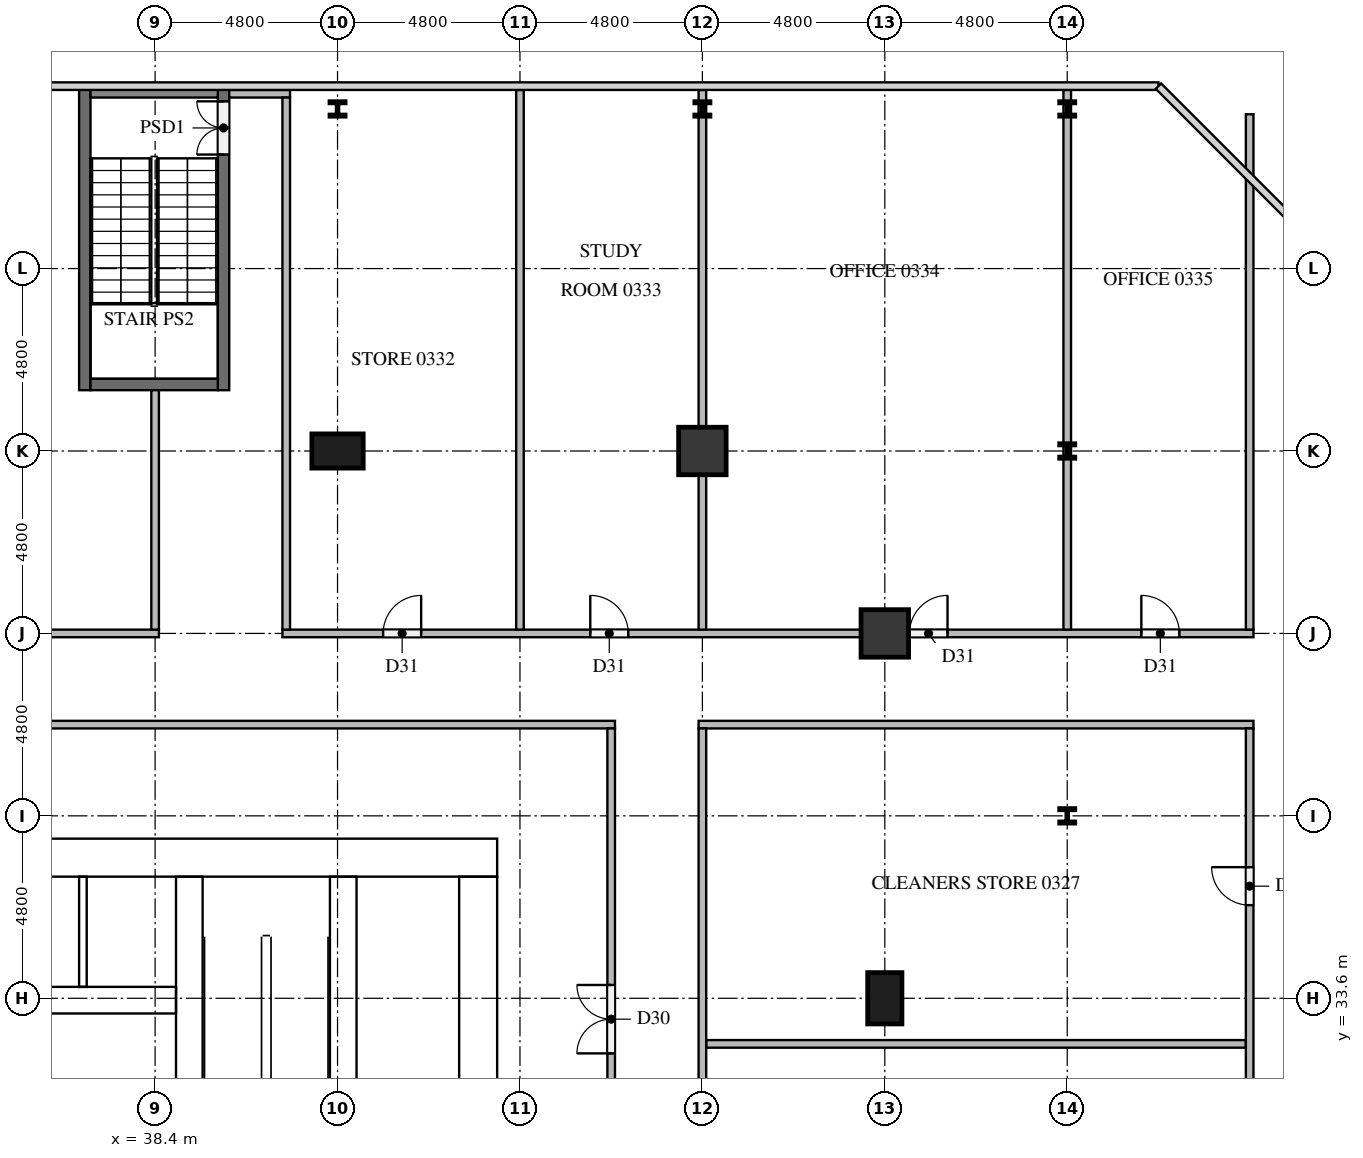
"""IFC4 building model, lengths in metres.
Left out: names, types, materials, properties, quantities, classifications, styles, units other than length and angle.
Written with IfcOpenShell. Run it as: python <this file> out.ifc"""

import sys

from ifc_helpers import new_model, si_unit, direction, frame, frame_2d, origin, origin_2d, place, context, subcontext, project, spatial, rectangle, i_section, extrude, element, fill, save


model = new_model("IFC4")
c1 = context("Model", 3, precision=1e-05, world=origin(), true_north=direction((0.0, 1.0)))
c2 = subcontext(c1, "Body", "Model", "MODEL_VIEW")
j1 = project(units=[si_unit("LENGTHUNIT", "METRE"), si_unit("PLANEANGLEUNIT", "RADIAN")], contexts=[c1])
p1 = place(None, origin())
s1 = spatial("IfcSite", under=j1, at=p1, CompositionType="ELEMENT")
p2 = place(p1, origin())
s2 = spatial("IfcBuilding", under=s1, at=p2, CompositionType="ELEMENT")
p3 = place(p2, frame((0.0, 0.0, 15.0)))
s3 = spatial("IfcBuildingStorey", under=s2, at=p3, CompositionType="ELEMENT", Elevation=15.0)
p4 = place(p3, frame((36.55, 49.6, 0.0), z_axis=(0.0, 0.0, 1.0), x_axis=(0.0, 1.0, 0.0)))
e1 = element("IfcWall", 1, at=p4, inside=s3, PredefinedType="SOLIDWALL", context=c2, shape_type="SweptSolid", body=[
    extrude(rectangle(XDim=8.0, YDim=0.3, at=frame_2d((4.0, 0.0))), origin(), (0.0, 0.0, 1.0), 4.2),
])
p5 = place(p3, frame((40.2, 49.6, 0.0), z_axis=(0.0, 0.0, 1.0), x_axis=(0.0, 1.0, 0.0)))
e2 = element("IfcWall", 2, at=p5, inside=s3, PredefinedType="SOLIDWALL", context=c2, shape_type="SweptSolid", body=[
    extrude(rectangle(XDim=8.0, YDim=0.3, at=frame_2d((4.0, 0.0))), origin(), (0.0, 0.0, 1.0), 4.2),
])
p6 = place(p5, frame((6.2, 0.0, 0.0)))
e3 = element("IfcOpeningElement", 3, at=p6, cuts=e2, PredefinedType="OPENING", context=c2, shape_type="SweptSolid", body=[
    extrude(rectangle(XDim=1.4, YDim=2.1, at=frame_2d((0.7, 1.05))), frame((0.0, 0.16, 0.0), z_axis=(0.0, -1.0, 0.0), x_axis=(1.0, 0.0, 0.0)), (0.0, 0.0, 1.0), 0.32),
])
for number, where, z_axis, x_axis in (
    (4, (36.7, 49.75, 0.0), (0.0, 0.0, 1.0), (1.0, 0.0, 0.0)),
    (5, (36.7, 57.45, 0.0), (0.0, 0.0, 1.0), (1.0, 0.0, 0.0)),
):
    element("IfcWall", number, at=place(p3, frame(where, z_axis=z_axis, x_axis=x_axis)), inside=s3, PredefinedType="SOLIDWALL", context=c2, shape_type="SweptSolid", body=[
        extrude(rectangle(XDim=3.35, YDim=0.3, at=frame_2d((1.675, 0.0))), origin(), (0.0, 0.0, 1.0), 4.2),
    ])
p7 = place(p3, frame((15.0, 37.3, 0.0), z_axis=(0.0, 0.0, 1.0), x_axis=(1.0, 0.0, 0.0)))
e6 = element("IfcWall", 6, at=p7, inside=s3, PredefinedType="SHEAR", context=c2, shape_type="SweptSolid", body=[
    extrude(rectangle(XDim=32.4, YDim=1.0, at=frame_2d((16.2, 0.0))), origin(), (0.0, 0.0, 1.0), 4.2),
])
p8 = place(p7, frame((15.3, 0.0, 0.0)))
e7 = element("IfcOpeningElement", 7, at=p8, cuts=e6, PredefinedType="OPENING", context=c2, shape_type="SweptSolid", body=[
    extrude(rectangle(XDim=1.8, YDim=2.1, at=frame_2d((0.9, 1.05))), frame((0.0, 0.51, 0.0), z_axis=(0.0, -1.0, 0.0), x_axis=(1.0, 0.0, 0.0)), (0.0, 0.0, 1.0), 1.02),
])
p9 = place(p7, frame((1.766, 0.0, 0.0)))
e8 = element("IfcOpeningElement", 8, at=p9, cuts=e6, PredefinedType="OPENING", context=c2, shape_type="SweptSolid", body=[
    extrude(rectangle(XDim=1.0, YDim=2.1, at=frame_2d((0.5, 1.05))), frame((0.0, 0.51, 0.0), z_axis=(0.0, -1.0, 0.0), x_axis=(1.0, 0.0, 0.0)), (0.0, 0.0, 1.0), 1.02),
])
p10 = place(p7, frame((5.241, 0.0, 0.0)))
e9 = element("IfcOpeningElement", 9, at=p10, cuts=e6, PredefinedType="OPENING", context=c2, shape_type="SweptSolid", body=[
    extrude(rectangle(XDim=1.0, YDim=2.1, at=frame_2d((0.5, 1.05))), frame((0.0, 0.51, 0.0), z_axis=(0.0, -1.0, 0.0), x_axis=(1.0, 0.0, 0.0)), (0.0, 0.0, 1.0), 1.02),
])
p11 = place(p3, frame((46.9, 16.0, 0.0), z_axis=(0.0, 0.0, 1.0), x_axis=(0.0, 1.0, 0.0)))
e10 = element("IfcWall", 10, at=p11, inside=s3, PredefinedType="SHEAR", context=c2, shape_type="SweptSolid", body=[
    extrude(rectangle(XDim=20.8, YDim=1.0, at=frame_2d((10.4, 0.0))), origin(), (0.0, 0.0, 1.0), 4.2),
])
p12 = place(p11, frame((10.1, 0.0, 0.0)))
e11 = element("IfcOpeningElement", 11, at=p12, cuts=e10, PredefinedType="OPENING", context=c2, shape_type="SweptSolid", body=[
    extrude(rectangle(XDim=1.2, YDim=2.1, at=frame_2d((0.6, 1.05))), frame((0.0, 0.51, 0.0), z_axis=(0.0, -1.0, 0.0), x_axis=(1.0, 0.0, 0.0)), (0.0, 0.0, 1.0), 1.02),
])
p13 = place(p3, frame((39.3, 27.75, 0.0), z_axis=(0.0, 0.0, 1.0), x_axis=(0.0, 1.0, 0.0)))
e12 = element("IfcWall", 12, at=p13, inside=s3, PredefinedType="SHEAR", context=c2, shape_type="SweptSolid", body=[
    extrude(rectangle(XDim=9.05, YDim=0.7, at=frame_2d((4.525, 0.0))), origin(), (0.0, 0.0, 1.0), 4.2),
])
p14 = place(p3, frame((43.35, 27.75, 0.0), z_axis=(0.0, 0.0, 1.0), x_axis=(0.0, 1.0, 0.0)))
e13 = element("IfcWall", 13, at=p14, inside=s3, PredefinedType="SHEAR", context=c2, shape_type="SweptSolid", body=[
    extrude(rectangle(XDim=9.05, YDim=0.7, at=frame_2d((4.525, 0.0))), origin(), (0.0, 0.0, 1.0), 4.2),
])
p15 = place(p14, frame((7.65, 0.0, 0.0)))
e14 = element("IfcOpeningElement", 14, at=p15, cuts=e13, PredefinedType="OPENING", context=c2, shape_type="SweptSolid", body=[
    extrude(rectangle(XDim=1.2, YDim=2.1, at=frame_2d((0.6, 1.05))), frame((0.0, 0.36, 0.0), z_axis=(0.0, -1.0, 0.0), x_axis=(1.0, 0.0, 0.0)), (0.0, 0.0, 1.0), 0.72),
])
p16 = place(p3, frame((33.35, 33.55, 0.0), z_axis=(0.0, 0.0, 1.0), x_axis=(1.0, 0.0, 0.0)))
e15 = element("IfcWall", 15, at=p16, inside=s3, PredefinedType="SHEAR", context=c2, shape_type="SweptSolid", body=[
    extrude(rectangle(XDim=5.6, YDim=0.7, at=frame_2d((2.8, 0.0))), origin(), (0.0, 0.0, 1.0), 4.2),
])
p17 = place(p3, frame((57.6, 33.6, 0.0), z_axis=(0.0, 0.0, 1.0), x_axis=(0.0, 1.0, 0.0)))
e16 = element("IfcColumn", 16, at=p17, inside=s3, PredefinedType="COLUMN", context=c2, shape_type="SweptSolid", body=[
    extrude(rectangle(XDim=1.35, YDim=0.9, at=origin_2d()), origin(), (0.0, 0.0, 1.0), 4.2),
])
for number, where, z_axis, x_axis in (
    (17, (57.6, 43.2, 0.0), (0.0, 0.0, 1.0), (1.0, 0.0, 0.0)),
    (18, (52.8, 48.0, 0.0), (0.0, 0.0, 1.0), (1.0, 0.0, 0.0)),
):
    element("IfcColumn", number, at=place(p3, frame(where, z_axis=z_axis, x_axis=x_axis)), inside=s3, PredefinedType="COLUMN", context=c2, shape_type="SweptSolid", body=[
        extrude(rectangle(XDim=1.25, YDim=1.25, at=origin_2d()), origin(), (0.0, 0.0, 1.0), 4.2),
    ])
p18 = place(p3, frame((43.2, 48.0, 0.0), z_axis=(0.0, 0.0, 1.0), x_axis=(1.0, 0.0, 0.0)))
e19 = element("IfcColumn", 19, at=p18, inside=s3, PredefinedType="COLUMN", context=c2, shape_type="SweptSolid", body=[
    extrude(rectangle(XDim=1.35, YDim=0.9, at=origin_2d()), origin(), (0.0, 0.0, 1.0), 4.2),
])
for number, where, z_axis, x_axis in (
    (20, (43.2, 57.0, 0.0), (0.0, 0.0, 1.0), (1.0, 0.0, 0.0)),
    (21, (52.8, 57.0, 0.0), (0.0, 0.0, 1.0), (1.0, 0.0, 0.0)),
    (22, (62.4, 38.4, 0.0), (0.0, 0.0, 1.0), (1.0, 0.0, 0.0)),
    (23, (62.4, 48.0, 0.0), (0.0, 0.0, 1.0), (1.0, 0.0, 0.0)),
    (24, (62.4, 57.0, 0.0), (0.0, 0.0, 1.0), (1.0, 0.0, 0.0)),
):
    element("IfcColumn", number, at=place(p3, frame(where, z_axis=z_axis, x_axis=x_axis)), inside=s3, PredefinedType="COLUMN", context=c2, shape_type="SweptSolid", body=[
        extrude(i_section(OverallWidth=0.396, OverallDepth=0.381, WebThickness=0.019, FlangeThickness=0.03, at=origin_2d()), origin(), (0.0, 0.0, 1.0), 4.2),
    ])
p19 = place(p3, frame((36.5, 33.9, 0.0), z_axis=(0.0, 0.0, 1.0), x_axis=(0.0, 1.0, 0.0)))
e25 = element("IfcWall", 25, at=p19, inside=s3, PredefinedType="SOLIDWALL", context=c2, shape_type="SweptSolid", body=[
    extrude(rectangle(XDim=2.9, YDim=0.2, at=frame_2d((1.45, 0.0))), origin(), (0.0, 0.0, 1.0), 4.2),
])
p20 = place(p3, frame((52.9, 32.4, 0.0), z_axis=(0.0, 0.0, 1.0), x_axis=(1.0, 0.0, 0.0)))
e26 = element("IfcWall", 26, at=p20, inside=s3, PredefinedType="PARTITIONING", context=c2, shape_type="SweptSolid", body=[
    extrude(rectangle(XDim=14.2, YDim=0.2, at=frame_2d((7.1, 0.0))), origin(), (0.0, 0.0, 1.0), 4.2),
])
p21 = place(p3, frame((50.5, 40.8, 0.0), z_axis=(0.0, 0.0, 1.0), x_axis=(-1.0, 0.0, 0.0)))
e27 = element("IfcWall", 27, at=p21, inside=s3, PredefinedType="PARTITIONING", context=c2, shape_type="SweptSolid", body=[
    extrude(rectangle(XDim=38.6, YDim=0.2, at=frame_2d((19.3, 0.0))), origin(), (0.0, 0.0, 1.0), 4.2),
])
p22 = place(p21, frame((18.45, 0.0, 0.0)))
e28 = element("IfcOpeningElement", 28, at=p22, cuts=e27, PredefinedType="OPENING", context=c2, shape_type="SweptSolid", body=[
    extrude(rectangle(XDim=1.8, YDim=2.1, at=frame_2d((0.9, 1.05))), frame((0.0, 0.11, 0.0), z_axis=(0.0, -1.0, 0.0), x_axis=(1.0, 0.0, 0.0)), (0.0, 0.0, 1.0), 0.22),
])
p23 = place(p21, frame((16.25, 0.0, 0.0)))
e29 = element("IfcOpeningElement", 29, at=p23, cuts=e27, PredefinedType="OPENING", context=c2, shape_type="SweptSolid", body=[
    extrude(rectangle(XDim=1.8, YDim=2.1, at=frame_2d((0.9, 1.05))), frame((0.0, 0.11, 0.0), z_axis=(0.0, -1.0, 0.0), x_axis=(1.0, 0.0, 0.0)), (0.0, 0.0, 1.0), 0.22),
])
p24 = place(p3, frame((52.7, 40.8, 0.0), z_axis=(0.0, 0.0, 1.0), x_axis=(1.0, 0.0, 0.0)))
e30 = element("IfcWall", 30, at=p24, inside=s3, PredefinedType="PARTITIONING", context=c2, shape_type="SweptSolid", body=[
    extrude(rectangle(XDim=14.6, YDim=0.2, at=frame_2d((7.3, 0.0))), origin(), (0.0, 0.0, 1.0), 4.2),
])
p25 = place(p3, frame((-4.9, 43.2, 0.0), z_axis=(0.0, 0.0, 1.0), x_axis=(1.0, 0.0, 0.0)))
e31 = element("IfcWall", 31, at=p25, inside=s3, PredefinedType="PARTITIONING", context=c2, shape_type="SweptSolid", body=[
    extrude(rectangle(XDim=43.4, YDim=0.2, at=frame_2d((21.7, 0.0))), origin(), (0.0, 0.0, 1.0), 4.2),
])
p26 = place(p25, frame((14.05, 0.0, 0.0)))
e32 = element("IfcOpeningElement", 32, at=p26, cuts=e31, PredefinedType="OPENING", context=c2, shape_type="SweptSolid", body=[
    extrude(rectangle(XDim=1.0, YDim=2.1, at=frame_2d((0.5, 1.05))), frame((0.0, 0.11, 0.0), z_axis=(0.0, -1.0, 0.0), x_axis=(1.0, 0.0, 0.0)), (0.0, 0.0, 1.0), 0.22),
])
p27 = place(p25, frame((23.55, 0.0, 0.0)))
e33 = element("IfcOpeningElement", 33, at=p27, cuts=e31, PredefinedType="OPENING", context=c2, shape_type="SweptSolid", body=[
    extrude(rectangle(XDim=1.0, YDim=2.1, at=frame_2d((0.5, 1.05))), frame((0.0, 0.11, 0.0), z_axis=(0.0, -1.0, 0.0), x_axis=(1.0, 0.0, 0.0)), (0.0, 0.0, 1.0), 0.22),
])
p28 = place(p25, frame((35.25, 0.0, 0.0)))
e34 = element("IfcOpeningElement", 34, at=p28, cuts=e31, PredefinedType="OPENING", context=c2, shape_type="SweptSolid", body=[
    extrude(rectangle(XDim=1.8, YDim=2.1, at=frame_2d((0.9, 1.05))), frame((0.0, 0.11, 0.0), z_axis=(0.0, -1.0, 0.0), x_axis=(1.0, 0.0, 0.0)), (0.0, 0.0, 1.0), 0.22),
])
p29 = place(p3, frame((41.75, 43.2, 0.0), z_axis=(0.0, 0.0, 1.0), x_axis=(1.0, 0.0, 0.0)))
e35 = element("IfcWall", 35, at=p29, inside=s3, PredefinedType="PARTITIONING", context=c2, shape_type="SweptSolid", body=[
    extrude(rectangle(XDim=25.55, YDim=0.2, at=frame_2d((12.775, 0.0))), origin(), (0.0, 0.0, 1.0), 4.2),
])
p30 = place(p29, frame((2.65, 0.0, 0.0)))
e36 = element("IfcOpeningElement", 36, at=p30, cuts=e35, PredefinedType="OPENING", context=c2, shape_type="SweptSolid", body=[
    extrude(rectangle(XDim=1.0, YDim=2.1, at=frame_2d((0.5, 1.05))), frame((0.0, 0.11, 0.0), z_axis=(0.0, -1.0, 0.0), x_axis=(1.0, 0.0, 0.0)), (0.0, 0.0, 1.0), 0.22),
])
p31 = place(p29, frame((8.1, 0.0, 0.0)))
e37 = element("IfcOpeningElement", 37, at=p31, cuts=e35, PredefinedType="OPENING", context=c2, shape_type="SweptSolid", body=[
    extrude(rectangle(XDim=1.0, YDim=2.1, at=frame_2d((0.5, 1.05))), frame((0.0, 0.11, 0.0), z_axis=(0.0, -1.0, 0.0), x_axis=(1.0, 0.0, 0.0)), (0.0, 0.0, 1.0), 0.22),
])
p32 = place(p29, frame((16.5, 0.0, 0.0)))
e38 = element("IfcOpeningElement", 38, at=p32, cuts=e35, PredefinedType="OPENING", context=c2, shape_type="SweptSolid", body=[
    extrude(rectangle(XDim=1.0, YDim=2.1, at=frame_2d((0.5, 1.05))), frame((0.0, 0.11, 0.0), z_axis=(0.0, -1.0, 0.0), x_axis=(1.0, 0.0, 0.0)), (0.0, 0.0, 1.0), 0.22),
])
p33 = place(p29, frame((22.6, 0.0, 0.0)))
e39 = element("IfcOpeningElement", 39, at=p33, cuts=e35, PredefinedType="OPENING", context=c2, shape_type="SweptSolid", body=[
    extrude(rectangle(XDim=1.0, YDim=2.1, at=frame_2d((0.5, 1.05))), frame((0.0, 0.11, 0.0), z_axis=(0.0, -1.0, 0.0), x_axis=(1.0, 0.0, 0.0)), (0.0, 0.0, 1.0), 0.22),
])
p34 = place(p3, frame((40.35, 57.4, 0.0), z_axis=(0.0, 0.0, 1.0), x_axis=(1.0, 0.0, 0.0)))
e40 = element("IfcWall", 40, at=p34, inside=s3, PredefinedType="PARTITIONING", context=c2, shape_type="SweptSolid", body=[
    extrude(rectangle(XDim=1.6, YDim=0.2, at=frame_2d((0.8, 0.0))), origin(), (0.0, 0.0, 1.0), 4.2),
])
p35 = place(p3, frame((38.4, 43.3, 0.0), z_axis=(0.0, 0.0, 1.0), x_axis=(0.0, 1.0, 0.0)))
e41 = element("IfcWall", 41, at=p35, inside=s3, PredefinedType="PARTITIONING", context=c2, shape_type="SweptSolid", body=[
    extrude(rectangle(XDim=6.3, YDim=0.2, at=frame_2d((3.15, 0.0))), origin(), (0.0, 0.0, 1.0), 4.2),
])
p36 = place(p3, frame((41.85, 43.3, 0.0), z_axis=(0.0, 0.0, 1.0), x_axis=(0.0, 1.0, 0.0)))
e42 = element("IfcWall", 42, at=p36, inside=s3, PredefinedType="PARTITIONING", context=c2, shape_type="SweptSolid", body=[
    extrude(rectangle(XDim=14.0, YDim=0.2, at=frame_2d((7.0, 0.0))), origin(), (0.0, 0.0, 1.0), 4.2),
])
p37 = place(p3, frame((48.0, 43.3, 0.0), z_axis=(0.0, 0.0, 1.0), x_axis=(0.0, 1.0, 0.0)))
e43 = element("IfcWall", 43, at=p37, inside=s3, PredefinedType="PARTITIONING", context=c2, shape_type="SweptSolid", body=[
    extrude(rectangle(XDim=14.2, YDim=0.2, at=frame_2d((7.1, 0.0))), origin(), (0.0, 0.0, 1.0), 4.2),
])
p38 = place(p3, frame((50.4, 12.1, 0.0), z_axis=(0.0, 0.0, 1.0), x_axis=(0.0, 1.0, 0.0)))
e44 = element("IfcWall", 44, at=p38, inside=s3, PredefinedType="PARTITIONING", context=c2, shape_type="SweptSolid", body=[
    extrude(rectangle(XDim=28.6, YDim=0.2, at=frame_2d((14.3, 0.0))), origin(), (0.0, 0.0, 1.0), 4.2),
])
p39 = place(p38, frame((20.05, 0.0, 0.0)))
e45 = element("IfcOpeningElement", 45, at=p39, cuts=e44, PredefinedType="OPENING", context=c2, shape_type="SweptSolid", body=[
    extrude(rectangle(XDim=1.8, YDim=2.1, at=frame_2d((0.9, 1.05))), frame((0.0, 0.11, 0.0), z_axis=(0.0, -1.0, 0.0), x_axis=(1.0, 0.0, 0.0)), (0.0, 0.0, 1.0), 0.22),
])
p40 = place(p3, frame((52.8, 43.3, 0.0), z_axis=(0.0, 0.0, 1.0), x_axis=(0.0, 1.0, 0.0)))
e46 = element("IfcWall", 46, at=p40, inside=s3, PredefinedType="PARTITIONING", context=c2, shape_type="SweptSolid", body=[
    extrude(rectangle(XDim=14.2, YDim=0.2, at=frame_2d((7.1, 0.0))), origin(), (0.0, 0.0, 1.0), 4.2),
])
p41 = place(p3, frame((52.8, 40.7, 0.0), z_axis=(0.0, 0.0, 1.0), x_axis=(0.0, -1.0, 0.0)))
e47 = element("IfcWall", 47, at=p41, inside=s3, PredefinedType="PARTITIONING", context=c2, shape_type="SweptSolid", body=[
    extrude(rectangle(XDim=28.6, YDim=0.2, at=frame_2d((14.3, 0.0))), origin(), (0.0, 0.0, 1.0), 4.2),
])
p42 = place(p41, frame((22.75, 0.0, 0.0)))
e48 = element("IfcOpeningElement", 48, at=p42, cuts=e47, PredefinedType="OPENING", context=c2, shape_type="SweptSolid", body=[
    extrude(rectangle(XDim=1.0, YDim=2.1, at=frame_2d((0.5, 1.05))), frame((0.0, 0.11, 0.0), z_axis=(0.0, -1.0, 0.0), x_axis=(1.0, 0.0, 0.0)), (0.0, 0.0, 1.0), 0.22),
])
p43 = place(p41, frame((12.55, 0.0, 0.0)))
e49 = element("IfcOpeningElement", 49, at=p43, cuts=e47, PredefinedType="OPENING", context=c2, shape_type="SweptSolid", body=[
    extrude(rectangle(XDim=1.0, YDim=2.1, at=frame_2d((0.5, 1.05))), frame((0.0, 0.11, 0.0), z_axis=(0.0, -1.0, 0.0), x_axis=(1.0, 0.0, 0.0)), (0.0, 0.0, 1.0), 0.22),
])
p44 = place(p3, frame((62.4, 43.3, 0.0), z_axis=(0.0, 0.0, 1.0), x_axis=(0.0, 1.0, 0.0)))
e50 = element("IfcWall", 50, at=p44, inside=s3, PredefinedType="PARTITIONING", context=c2, shape_type="SweptSolid", body=[
    extrude(rectangle(XDim=14.2, YDim=0.2, at=frame_2d((7.1, 0.0))), origin(), (0.0, 0.0, 1.0), 4.2),
])
p45 = place(p3, frame((67.2, 12.4, 0.0), z_axis=(0.0, 0.0, 1.0), x_axis=(0.0, 1.0, 0.0)))
e51 = element("IfcWall", 51, at=p45, inside=s3, PredefinedType="PARTITIONING", context=c2, shape_type="SweptSolid", body=[
    extrude(rectangle(XDim=28.3, YDim=0.2, at=frame_2d((14.15, 0.0))), origin(), (0.0, 0.0, 1.0), 4.2),
])
p46 = place(p45, frame((23.65, 0.0, 0.0)))
e52 = element("IfcOpeningElement", 52, at=p46, cuts=e51, PredefinedType="OPENING", context=c2, shape_type="SweptSolid", body=[
    extrude(rectangle(XDim=1.0, YDim=2.1, at=frame_2d((0.5, 1.05))), frame((0.0, 0.11, 0.0), z_axis=(0.0, -1.0, 0.0), x_axis=(1.0, 0.0, 0.0)), (0.0, 0.0, 1.0), 0.22),
])
p47 = place(p3, frame((67.2, 43.3, 0.0), z_axis=(0.0, 0.0, 1.0), x_axis=(0.0, 1.0, 0.0)))
e53 = element("IfcWall", 53, at=p47, inside=s3, PredefinedType="PARTITIONING", context=c2, shape_type="SweptSolid", body=[
    extrude(rectangle(XDim=13.56, YDim=0.2, at=frame_2d((6.78, 0.0))), origin(), (0.0, 0.0, 1.0), 4.2),
])
p48 = place(p15, origin())
e54 = element("IfcDoor", 54, at=p48, inside=s3, OperationType="SINGLE_SWING_LEFT", PredefinedType="DOOR", context=c2, shape_type="SweptSolid", body=[
    extrude(rectangle(XDim=1.2, YDim=2.1, at=frame_2d((0.6, 1.05))), frame((0.0, 0.025, 0.0), z_axis=(0.0, -1.0, 0.0), x_axis=(1.0, 0.0, 0.0)), (0.0, 0.0, 1.0), 0.05),
])
fill(e14, e54)
p49 = place(p6, origin())
e55 = element("IfcDoor", 55, at=p49, inside=s3, OperationType="DOUBLE_DOOR_SINGLE_SWING", PredefinedType="DOOR", context=c2, shape_type="SweptSolid", body=[
    extrude(rectangle(XDim=1.4, YDim=2.1, at=frame_2d((0.7, 1.05))), frame((0.0, 0.025, 0.0), z_axis=(0.0, -1.0, 0.0), x_axis=(1.0, 0.0, 0.0)), (0.0, 0.0, 1.0), 0.05),
])
fill(e3, e55)
p50 = place(p46, origin())
e56 = element("IfcDoor", 56, at=p50, inside=s3, OperationType="SINGLE_SWING_RIGHT", PredefinedType="DOOR", context=c2, shape_type="SweptSolid", body=[
    extrude(rectangle(XDim=1.0, YDim=2.1, at=frame_2d((0.5, 1.05))), frame((0.0, 0.025, 0.0), z_axis=(0.0, -1.0, 0.0), x_axis=(1.0, 0.0, 0.0)), (0.0, 0.0, 1.0), 0.05),
])
fill(e52, e56)
p51 = place(p30, origin())
e57 = element("IfcDoor", 57, at=p51, inside=s3, OperationType="SINGLE_SWING_RIGHT", PredefinedType="DOOR", context=c2, shape_type="SweptSolid", body=[
    extrude(rectangle(XDim=1.0, YDim=2.1, at=frame_2d((0.5, 1.05))), frame((0.0, 0.025, 0.0), z_axis=(0.0, -1.0, 0.0), x_axis=(1.0, 0.0, 0.0)), (0.0, 0.0, 1.0), 0.05),
])
fill(e36, e57)
p52 = place(p31, origin())
e58 = element("IfcDoor", 58, at=p52, inside=s3, OperationType="SINGLE_SWING_LEFT", PredefinedType="DOOR", context=c2, shape_type="SweptSolid", body=[
    extrude(rectangle(XDim=1.0, YDim=2.1, at=frame_2d((0.5, 1.05))), frame((0.0, 0.025, 0.0), z_axis=(0.0, -1.0, 0.0), x_axis=(1.0, 0.0, 0.0)), (0.0, 0.0, 1.0), 0.05),
])
fill(e37, e58)
p53 = place(p32, origin())
e59 = element("IfcDoor", 59, at=p53, inside=s3, OperationType="SINGLE_SWING_RIGHT", PredefinedType="DOOR", context=c2, shape_type="SweptSolid", body=[
    extrude(rectangle(XDim=1.0, YDim=2.1, at=frame_2d((0.5, 1.05))), frame((0.0, 0.025, 0.0), z_axis=(0.0, -1.0, 0.0), x_axis=(1.0, 0.0, 0.0)), (0.0, 0.0, 1.0), 0.05),
])
fill(e38, e59)
p54 = place(p33, origin())
e60 = element("IfcDoor", 60, at=p54, inside=s3, OperationType="SINGLE_SWING_LEFT", PredefinedType="DOOR", context=c2, shape_type="SweptSolid", body=[
    extrude(rectangle(XDim=1.0, YDim=2.1, at=frame_2d((0.5, 1.05))), frame((0.0, 0.025, 0.0), z_axis=(0.0, -1.0, 0.0), x_axis=(1.0, 0.0, 0.0)), (0.0, 0.0, 1.0), 0.05),
])
fill(e39, e60)
p55 = place(p39, origin())
e61 = element("IfcDoor", 61, at=p55, inside=s3, OperationType="DOUBLE_DOOR_SINGLE_SWING", PredefinedType="DOOR", context=c2, shape_type="SweptSolid", body=[
    extrude(rectangle(XDim=1.8, YDim=2.1, at=frame_2d((0.9, 1.05))), frame((0.0, 0.025, 0.0), z_axis=(0.0, -1.0, 0.0), x_axis=(1.0, 0.0, 0.0)), (0.0, 0.0, 1.0), 0.05),
])
fill(e45, e61)
save(model, sys.argv[1])
